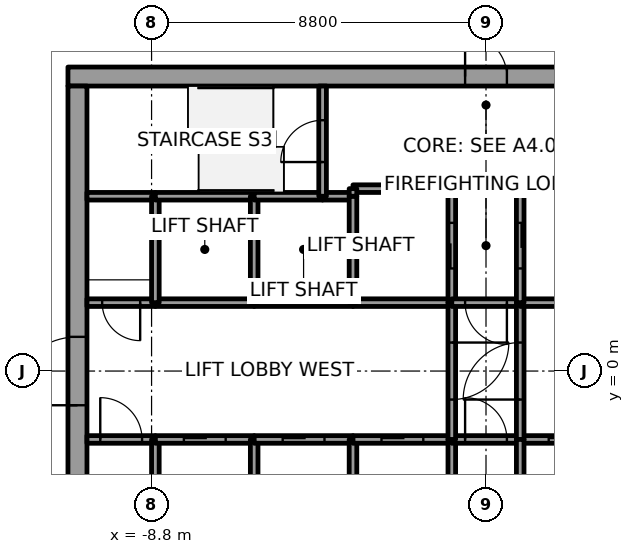
"""IFC4 building model, lengths in metres.
Left out: names, types, materials, properties, quantities, classifications, styles, units other than length and angle.
Written with IfcOpenShell. Run it as: python <this file> out.ifc"""

import sys

from ifc_helpers import new_model, si_unit, direction, frame, frame_2d, origin, place, context, subcontext, project, spatial, rectangle, extrude, element, fill, save


model = new_model("IFC4")
c1 = context("Model", 3, precision=1e-05, world=origin(), true_north=direction((0.0, 1.0)))
c2 = subcontext(c1, "Body", "Model", "MODEL_VIEW")
j1 = project(units=[si_unit("LENGTHUNIT", "METRE"), si_unit("PLANEANGLEUNIT", "RADIAN")], contexts=[c1])
p1 = place(None, origin())
s1 = spatial("IfcSite", under=j1, at=p1, CompositionType="ELEMENT")
p2 = place(p1, origin())
s2 = spatial("IfcBuilding", under=s1, at=p2, CompositionType="ELEMENT")
p3 = place(p2, frame((0.0, 0.0, 16.8)))
s3 = spatial("IfcBuildingStorey", under=s2, at=p3, CompositionType="ELEMENT", Elevation=16.8)
p4 = place(p3, frame((-11.0, 7.75, 0.0), z_axis=(0.0, 0.0, 1.0), x_axis=(1.0, 0.0, 0.0)))
e1 = element("IfcWall", 1, at=p4, inside=s3, PredefinedType="SHEAR", context=c2, shape_type="SweptSolid", body=[
    extrude(rectangle(XDim=22.0, YDim=0.5, at=frame_2d((11.0, 0.0))), origin(), (0.0, 0.0, 1.0), 5.4),
])
p5 = place(p4, frame((10.45, 0.0, 0.0)))
e2 = element("IfcOpeningElement", 2, at=p5, cuts=e1, PredefinedType="OPENING", context=c2, shape_type="SweptSolid", body=[
    extrude(rectangle(XDim=1.1, YDim=2.1, at=frame_2d((0.55, 1.05))), frame((0.0, 0.25, 0.0), z_axis=(0.0, -1.0, 0.0), x_axis=(1.0, 0.0, 0.0)), (0.0, 0.0, 1.0), 0.5),
])
p6 = place(p3, frame((-10.75, -7.5, 0.0), z_axis=(0.0, 0.0, 1.0), x_axis=(0.0, 1.0, 0.0)))
e3 = element("IfcWall", 3, at=p6, inside=s3, PredefinedType="SHEAR", context=c2, shape_type="SweptSolid", body=[
    extrude(rectangle(XDim=15.0, YDim=0.5, at=frame_2d((7.5, 0.0))), origin(), (0.0, 0.0, 1.0), 5.4),
])
p7 = place(p6, frame((6.6, 0.0, 0.0)))
e4 = element("IfcOpeningElement", 4, at=p7, cuts=e3, PredefinedType="OPENING", context=c2, shape_type="SweptSolid", body=[
    extrude(rectangle(XDim=1.8, YDim=2.1, at=frame_2d((0.9, 1.05))), frame((0.0, 0.25, 0.0), z_axis=(0.0, -1.0, 0.0), x_axis=(1.0, 0.0, 0.0)), (0.0, 0.0, 1.0), 0.5),
])
p8 = place(p3, frame((-10.5, -1.8, 0.0), z_axis=(0.0, 0.0, 1.0), x_axis=(1.0, 0.0, 0.0)))
e5 = element("IfcWall", 5, at=p8, inside=s3, PredefinedType="SOLIDWALL", context=c2, shape_type="SweptSolid", body=[
    extrude(rectangle(XDim=1.8, YDim=0.2, at=frame_2d((0.9, 0.0))), origin(), (0.0, 0.0, 1.0), 5.15),
])
p9 = place(p8, frame((0.35, 0.0, 0.0)))
e6 = element("IfcOpeningElement", 6, at=p9, cuts=e5, PredefinedType="OPENING", context=c2, shape_type="SweptSolid", body=[
    extrude(rectangle(XDim=1.1, YDim=2.4, at=frame_2d((0.55, 1.2))), frame((0.0, 0.1, 0.0), z_axis=(0.0, -1.0, 0.0), x_axis=(1.0, 0.0, 0.0)), (0.0, 0.0, 1.0), 0.2),
])
p10 = place(p3, frame((-8.7, 1.8, 0.0), z_axis=(0.0, 0.0, 1.0), x_axis=(-1.0, 0.0, 0.0)))
e7 = element("IfcWall", 7, at=p10, inside=s3, PredefinedType="SOLIDWALL", context=c2, shape_type="SweptSolid", body=[
    extrude(rectangle(XDim=1.8, YDim=0.2, at=frame_2d((0.9, 0.0))), origin(), (0.0, 0.0, 1.0), 5.15),
])
p11 = place(p10, frame((0.4, 0.0, 0.0)))
e8 = element("IfcOpeningElement", 8, at=p11, cuts=e7, PredefinedType="OPENING", context=c2, shape_type="SweptSolid", body=[
    extrude(rectangle(XDim=1.0, YDim=2.4, at=frame_2d((0.5, 1.2))), frame((0.0, 0.1, 0.0), z_axis=(0.0, -1.0, 0.0), x_axis=(1.0, 0.0, 0.0)), (0.0, 0.0, 1.0), 0.2),
])
p12 = place(p3, frame((-8.7, 4.6, 0.0), z_axis=(0.0, 0.0, 1.0), x_axis=(-1.0, 0.0, 0.0)))
e9 = element("IfcWall", 9, at=p12, inside=s3, PredefinedType="SOLIDWALL", context=c2, shape_type="SweptSolid", body=[
    extrude(rectangle(XDim=1.8, YDim=0.2, at=frame_2d((0.9, 0.0))), origin(), (0.0, 0.0, 1.0), 5.15),
])
p13 = place(p3, frame((-8.7, -4.6, 0.0), z_axis=(0.0, 0.0, 1.0), x_axis=(0.0, 1.0, 0.0)))
e10 = element("IfcWall", 10, at=p13, inside=s3, PredefinedType="SOLIDWALL", context=c2, shape_type="SweptSolid", body=[
    extrude(rectangle(XDim=2.8, YDim=0.2, at=frame_2d((1.4, 0.0))), origin(), (0.0, 0.0, 1.0), 5.15),
])
p14 = place(p3, frame((-8.7, -1.8, 0.0), z_axis=(0.0, 0.0, 1.0), x_axis=(1.0, 0.0, 0.0)))
e11 = element("IfcWall", 11, at=p14, inside=s3, PredefinedType="SOLIDWALL", context=c2, shape_type="SweptSolid", body=[
    extrude(rectangle(XDim=2.6, YDim=0.2, at=frame_2d((1.3, 0.0))), origin(), (0.0, 0.0, 1.0), 5.15),
])
p15 = place(p14, frame((0.75, 0.0, 0.0)))
e12 = element("IfcOpeningElement", 12, at=p15, cuts=e11, PredefinedType="OPENING", context=c2, shape_type="SweptSolid", body=[
    extrude(rectangle(XDim=1.1, YDim=2.1, at=frame_2d((0.55, 1.05))), frame((0.0, 0.1, 0.0), z_axis=(0.0, -1.0, 0.0), x_axis=(1.0, 0.0, 0.0)), (0.0, 0.0, 1.0), 0.2),
])
p16 = place(p3, frame((-6.1, 1.8, 0.0), z_axis=(0.0, 0.0, 1.0), x_axis=(-1.0, 0.0, 0.0)))
e13 = element("IfcWall", 13, at=p16, inside=s3, PredefinedType="SOLIDWALL", context=c2, shape_type="SweptSolid", body=[
    extrude(rectangle(XDim=2.6, YDim=0.2, at=frame_2d((1.3, 0.0))), origin(), (0.0, 0.0, 1.0), 5.15),
])
p17 = place(p3, frame((-8.7, 1.8, 0.0), z_axis=(0.0, 0.0, 1.0), x_axis=(0.0, 1.0, 0.0)))
e14 = element("IfcWall", 14, at=p17, inside=s3, PredefinedType="SOLIDWALL", context=c2, shape_type="SweptSolid", body=[
    extrude(rectangle(XDim=2.8, YDim=0.2, at=frame_2d((1.4, 0.0))), origin(), (0.0, 0.0, 1.0), 5.15),
])
p18 = place(p3, frame((-6.1, 4.6, 0.0), z_axis=(0.0, 0.0, 1.0), x_axis=(-1.0, 0.0, 0.0)))
e15 = element("IfcWall", 15, at=p18, inside=s3, PredefinedType="SOLIDWALL", context=c2, shape_type="SweptSolid", body=[
    extrude(rectangle(XDim=2.6, YDim=0.2, at=frame_2d((1.3, 0.0))), origin(), (0.0, 0.0, 1.0), 5.15),
])
p19 = place(p3, frame((-6.1, -4.6, 0.0), z_axis=(0.0, 0.0, 1.0), x_axis=(0.0, 1.0, 0.0)))
e16 = element("IfcWall", 16, at=p19, inside=s3, PredefinedType="SOLIDWALL", context=c2, shape_type="SweptSolid", body=[
    extrude(rectangle(XDim=2.8, YDim=0.2, at=frame_2d((1.4, 0.0))), origin(), (0.0, 0.0, 1.0), 5.15),
])
p20 = place(p3, frame((-6.1, -1.8, 0.0), z_axis=(0.0, 0.0, 1.0), x_axis=(1.0, 0.0, 0.0)))
e17 = element("IfcWall", 17, at=p20, inside=s3, PredefinedType="SOLIDWALL", context=c2, shape_type="SweptSolid", body=[
    extrude(rectangle(XDim=2.6, YDim=0.2, at=frame_2d((1.3, 0.0))), origin(), (0.0, 0.0, 1.0), 5.15),
])
p21 = place(p20, frame((0.75, 0.0, 0.0)))
e18 = element("IfcOpeningElement", 18, at=p21, cuts=e17, PredefinedType="OPENING", context=c2, shape_type="SweptSolid", body=[
    extrude(rectangle(XDim=1.1, YDim=2.1, at=frame_2d((0.55, 1.05))), frame((0.0, 0.1, 0.0), z_axis=(0.0, -1.0, 0.0), x_axis=(1.0, 0.0, 0.0)), (0.0, 0.0, 1.0), 0.2),
])
p22 = place(p3, frame((-3.5, 1.8, 0.0), z_axis=(0.0, 0.0, 1.0), x_axis=(-1.0, 0.0, 0.0)))
e19 = element("IfcWall", 19, at=p22, inside=s3, PredefinedType="SOLIDWALL", context=c2, shape_type="SweptSolid", body=[
    extrude(rectangle(XDim=2.6, YDim=0.2, at=frame_2d((1.3, 0.0))), origin(), (0.0, 0.0, 1.0), 5.15),
])
p23 = place(p3, frame((-6.1, 1.8, 0.0), z_axis=(0.0, 0.0, 1.0), x_axis=(0.0, 1.0, 0.0)))
e20 = element("IfcWall", 20, at=p23, inside=s3, PredefinedType="SOLIDWALL", context=c2, shape_type="SweptSolid", body=[
    extrude(rectangle(XDim=2.8, YDim=0.2, at=frame_2d((1.4, 0.0))), origin(), (0.0, 0.0, 1.0), 5.15),
])
p24 = place(p3, frame((-4.3, 4.6, 0.0), z_axis=(0.0, 0.0, 1.0), x_axis=(-1.0, 0.0, 0.0)))
e21 = element("IfcWall", 21, at=p24, inside=s3, PredefinedType="SOLIDWALL", context=c2, shape_type="SweptSolid", body=[
    extrude(rectangle(XDim=1.8, YDim=0.2, at=frame_2d((0.9, 0.0))), origin(), (0.0, 0.0, 1.0), 5.15),
])
p25 = place(p3, frame((-3.5, 4.6, 0.0), z_axis=(0.0, 0.0, 1.0), x_axis=(-1.0, 0.0, 0.0)))
e22 = element("IfcWall", 22, at=p25, inside=s3, PredefinedType="SOLIDWALL", context=c2, shape_type="SweptSolid", body=[
    extrude(rectangle(XDim=0.8, YDim=0.2, at=frame_2d((0.4, 0.0))), origin(), (0.0, 0.0, 1.0), 5.15),
])
p26 = place(p3, frame((-4.3, 4.6, 0.0), z_axis=(0.0, 0.0, 1.0), x_axis=(0.0, 1.0, 0.0)))
e23 = element("IfcWall", 23, at=p26, inside=s3, PredefinedType="SOLIDWALL", context=c2, shape_type="SweptSolid", body=[
    extrude(rectangle(XDim=2.9, YDim=0.2, at=frame_2d((1.45, 0.0))), origin(), (0.0, 0.0, 1.0), 5.15),
])
p27 = place(p26, frame((0.9, 0.0, 0.0)))
e24 = element("IfcOpeningElement", 24, at=p27, cuts=e23, PredefinedType="OPENING", context=c2, shape_type="SweptSolid", body=[
    extrude(rectangle(XDim=1.1, YDim=2.4, at=frame_2d((0.55, 1.2))), frame((0.0, 0.1, 0.0), z_axis=(0.0, -1.0, 0.0), x_axis=(1.0, 0.0, 0.0)), (0.0, 0.0, 1.0), 0.2),
])
p28 = place(p3, frame((-3.5, -4.6, 0.0), z_axis=(0.0, 0.0, 1.0), x_axis=(0.0, 1.0, 0.0)))
e25 = element("IfcWall", 25, at=p28, inside=s3, PredefinedType="SOLIDWALL", context=c2, shape_type="SweptSolid", body=[
    extrude(rectangle(XDim=2.8, YDim=0.2, at=frame_2d((1.4, 0.0))), origin(), (0.0, 0.0, 1.0), 5.15),
])
p29 = place(p3, frame((-3.5, -1.8, 0.0), z_axis=(0.0, 0.0, 1.0), x_axis=(1.0, 0.0, 0.0)))
e26 = element("IfcWall", 26, at=p29, inside=s3, PredefinedType="SOLIDWALL", context=c2, shape_type="SweptSolid", body=[
    extrude(rectangle(XDim=2.6, YDim=0.2, at=frame_2d((1.3, 0.0))), origin(), (0.0, 0.0, 1.0), 5.15),
])
p30 = place(p29, frame((0.75, 0.0, 0.0)))
e27 = element("IfcOpeningElement", 27, at=p30, cuts=e26, PredefinedType="OPENING", context=c2, shape_type="SweptSolid", body=[
    extrude(rectangle(XDim=1.1, YDim=2.1, at=frame_2d((0.55, 1.05))), frame((0.0, 0.1, 0.0), z_axis=(0.0, -1.0, 0.0), x_axis=(1.0, 0.0, 0.0)), (0.0, 0.0, 1.0), 0.2),
])
p31 = place(p3, frame((-0.9, 1.8, 0.0), z_axis=(0.0, 0.0, 1.0), x_axis=(-1.0, 0.0, 0.0)))
e28 = element("IfcWall", 28, at=p31, inside=s3, PredefinedType="SOLIDWALL", context=c2, shape_type="SweptSolid", body=[
    extrude(rectangle(XDim=2.6, YDim=0.2, at=frame_2d((1.3, 0.0))), origin(), (0.0, 0.0, 1.0), 5.15),
])
p32 = place(p3, frame((-3.5, 4.6, 0.0), z_axis=(0.0, 0.0, 1.0), x_axis=(0.0, -1.0, 0.0)))
e29 = element("IfcWall", 29, at=p32, inside=s3, PredefinedType="SOLIDWALL", context=c2, shape_type="SweptSolid", body=[
    extrude(rectangle(XDim=2.8, YDim=0.2, at=frame_2d((1.4, 0.0))), origin(), (0.0, 0.0, 1.0), 5.15),
])
p33 = place(p3, frame((-0.9, 1.8, 0.0), z_axis=(0.0, 0.0, 1.0), x_axis=(0.0, 1.0, 0.0)))
e30 = element("IfcWall", 30, at=p33, inside=s3, PredefinedType="SOLIDWALL", context=c2, shape_type="SweptSolid", body=[
    extrude(rectangle(XDim=3.0, YDim=0.2, at=frame_2d((1.5, 0.0))), origin(), (0.0, 0.0, 1.0), 5.15),
])
p34 = place(p33, frame((0.9, 0.0, 0.0)))
e31 = element("IfcOpeningElement", 31, at=p34, cuts=e30, PredefinedType="OPENING", context=c2, shape_type="SweptSolid", body=[
    extrude(rectangle(XDim=1.2, YDim=2.1, at=frame_2d((0.6, 1.05))), frame((0.0, 0.1, 0.0), z_axis=(0.0, -1.0, 0.0), x_axis=(1.0, 0.0, 0.0)), (0.0, 0.0, 1.0), 0.2),
])
p35 = place(p3, frame((-0.9, 4.8, 0.0), z_axis=(0.0, 0.0, 1.0), x_axis=(-1.0, 0.0, 0.0)))
e32 = element("IfcWall", 32, at=p35, inside=s3, PredefinedType="SOLIDWALL", context=c2, shape_type="SweptSolid", body=[
    extrude(rectangle(XDim=2.6, YDim=0.2, at=frame_2d((1.3, 0.0))), origin(), (0.0, 0.0, 1.0), 5.15),
])
p36 = place(p3, frame((-3.5, 4.8, 0.0), z_axis=(0.0, 0.0, 1.0), x_axis=(0.0, -1.0, 0.0)))
e33 = element("IfcWall", 33, at=p36, inside=s3, PredefinedType="SOLIDWALL", context=c2, shape_type="SweptSolid", body=[
    extrude(rectangle(XDim=0.2, YDim=0.2, at=frame_2d((0.1, 0.0))), origin(), (0.0, 0.0, 1.0), 5.15),
])
p37 = place(p3, frame((-0.9, -4.6, 0.0), z_axis=(0.0, 0.0, 1.0), x_axis=(0.0, 1.0, 0.0)))
e34 = element("IfcWall", 34, at=p37, inside=s3, PredefinedType="SOLIDWALL", context=c2, shape_type="SweptSolid", body=[
    extrude(rectangle(XDim=2.8, YDim=0.2, at=frame_2d((1.4, 0.0))), origin(), (0.0, 0.0, 1.0), 5.15),
])
p38 = place(p3, frame((-0.9, -1.8, 0.0), z_axis=(0.0, 0.0, 1.0), x_axis=(1.0, 0.0, 0.0)))
e35 = element("IfcWall", 35, at=p38, inside=s3, PredefinedType="SOLIDWALL", context=c2, shape_type="SweptSolid", body=[
    extrude(rectangle(XDim=1.8, YDim=0.2, at=frame_2d((0.9, 0.0))), origin(), (0.0, 0.0, 1.0), 5.15),
])
p39 = place(p38, frame((0.35, 0.0, 0.0)))
e36 = element("IfcOpeningElement", 36, at=p39, cuts=e35, PredefinedType="OPENING", context=c2, shape_type="SweptSolid", body=[
    extrude(rectangle(XDim=1.1, YDim=2.4, at=frame_2d((0.55, 1.2))), frame((0.0, 0.1, 0.0), z_axis=(0.0, -1.0, 0.0), x_axis=(1.0, 0.0, 0.0)), (0.0, 0.0, 1.0), 0.2),
])
p40 = place(p3, frame((-0.9, 1.8, 0.0), z_axis=(0.0, 0.0, 1.0), x_axis=(0.0, -1.0, 0.0)))
e37 = element("IfcWall", 37, at=p40, inside=s3, PredefinedType="SOLIDWALL", context=c2, shape_type="SweptSolid", body=[
    extrude(rectangle(XDim=3.6, YDim=0.2, at=frame_2d((1.8, 0.0))), origin(), (0.0, 0.0, 1.0), 5.15),
])
p41 = place(p40, frame((1.05, 0.0, 0.0)))
e38 = element("IfcOpeningElement", 38, at=p41, cuts=e37, PredefinedType="OPENING", context=c2, shape_type="SweptSolid", body=[
    extrude(rectangle(XDim=1.5, YDim=2.4, at=frame_2d((0.75, 1.2))), frame((0.0, 0.1, 0.0), z_axis=(0.0, -1.0, 0.0), x_axis=(1.0, 0.0, 0.0)), (0.0, 0.0, 1.0), 0.2),
])
p42 = place(p3, frame((0.9, 1.8, 0.0), z_axis=(0.0, 0.0, 1.0), x_axis=(-1.0, 0.0, 0.0)))
e39 = element("IfcWall", 39, at=p42, inside=s3, PredefinedType="SOLIDWALL", context=c2, shape_type="SweptSolid", body=[
    extrude(rectangle(XDim=1.8, YDim=0.2, at=frame_2d((0.9, 0.0))), origin(), (0.0, 0.0, 1.0), 5.15),
])
p43 = place(p42, frame((0.35, 0.0, 0.0)))
e40 = element("IfcOpeningElement", 40, at=p43, cuts=e39, PredefinedType="OPENING", context=c2, shape_type="SweptSolid", body=[
    extrude(rectangle(XDim=1.1, YDim=2.4, at=frame_2d((0.55, 1.2))), frame((0.0, 0.1, 0.0), z_axis=(0.0, -1.0, 0.0), x_axis=(1.0, 0.0, 0.0)), (0.0, 0.0, 1.0), 0.2),
])
p44 = place(p3, frame((0.9, -1.8, 0.0), z_axis=(0.0, 0.0, 1.0), x_axis=(1.0, 0.0, 0.0)))
e41 = element("IfcWall", 41, at=p44, inside=s3, PredefinedType="SOLIDWALL", context=c2, shape_type="SweptSolid", body=[
    extrude(rectangle(XDim=2.6, YDim=0.2, at=frame_2d((1.3, 0.0))), origin(), (0.0, 0.0, 1.0), 5.15),
])
p45 = place(p44, frame((0.75, 0.0, 0.0)))
e42 = element("IfcOpeningElement", 42, at=p45, cuts=e41, PredefinedType="OPENING", context=c2, shape_type="SweptSolid", body=[
    extrude(rectangle(XDim=1.1, YDim=2.1, at=frame_2d((0.55, 1.05))), frame((0.0, 0.1, 0.0), z_axis=(0.0, -1.0, 0.0), x_axis=(1.0, 0.0, 0.0)), (0.0, 0.0, 1.0), 0.2),
])
p46 = place(p3, frame((0.9, -1.8, 0.0), z_axis=(0.0, 0.0, 1.0), x_axis=(0.0, 1.0, 0.0)))
e43 = element("IfcWall", 43, at=p46, inside=s3, PredefinedType="SOLIDWALL", context=c2, shape_type="SweptSolid", body=[
    extrude(rectangle(XDim=3.6, YDim=0.2, at=frame_2d((1.8, 0.0))), origin(), (0.0, 0.0, 1.0), 5.15),
])
p47 = place(p46, frame((1.05, 0.0, 0.0)))
e44 = element("IfcOpeningElement", 44, at=p47, cuts=e43, PredefinedType="OPENING", context=c2, shape_type="SweptSolid", body=[
    extrude(rectangle(XDim=1.5, YDim=2.4, at=frame_2d((0.75, 1.2))), frame((0.0, 0.1, 0.0), z_axis=(0.0, -1.0, 0.0), x_axis=(1.0, 0.0, 0.0)), (0.0, 0.0, 1.0), 0.2),
])
p48 = place(p3, frame((0.9, -1.8, 0.0), z_axis=(0.0, 0.0, 1.0), x_axis=(0.0, -1.0, 0.0)))
e45 = element("IfcWall", 45, at=p48, inside=s3, PredefinedType="SOLIDWALL", context=c2, shape_type="SweptSolid", body=[
    extrude(rectangle(XDim=2.8, YDim=0.2, at=frame_2d((1.4, 0.0))), origin(), (0.0, 0.0, 1.0), 5.15),
])
for number, where, z_axis, x_axis in (
    (46, (3.5, 1.8, 0.0), (0.0, 0.0, 1.0), (-1.0, 0.0, 0.0)),
    (47, (3.5, 4.8, 0.0), (0.0, 0.0, 1.0), (-1.0, 0.0, 0.0)),
):
    element("IfcWall", number, at=place(p3, frame(where, z_axis=z_axis, x_axis=x_axis)), inside=s3, PredefinedType="SOLIDWALL", context=c2, shape_type="SweptSolid", body=[
        extrude(rectangle(XDim=2.6, YDim=0.2, at=frame_2d((1.3, 0.0))), origin(), (0.0, 0.0, 1.0), 5.15),
    ])
p49 = place(p3, frame((0.9, 4.8, 0.0), z_axis=(0.0, 0.0, 1.0), x_axis=(0.0, -1.0, 0.0)))
e48 = element("IfcWall", 48, at=p49, inside=s3, PredefinedType="SOLIDWALL", context=c2, shape_type="SweptSolid", body=[
    extrude(rectangle(XDim=3.0, YDim=0.2, at=frame_2d((1.5, 0.0))), origin(), (0.0, 0.0, 1.0), 5.15),
])
p50 = place(p49, frame((0.9, 0.0, 0.0)))
e49 = element("IfcOpeningElement", 49, at=p50, cuts=e48, PredefinedType="OPENING", context=c2, shape_type="SweptSolid", body=[
    extrude(rectangle(XDim=1.2, YDim=2.1, at=frame_2d((0.6, 1.05))), frame((0.0, 0.1, 0.0), z_axis=(0.0, -1.0, 0.0), x_axis=(1.0, 0.0, 0.0)), (0.0, 0.0, 1.0), 0.2),
])
p51 = place(p15, origin())
e50 = element("IfcDoor", 50, at=p51, inside=s3, OperationType="SLIDING_TO_LEFT", PredefinedType="DOOR", context=c2, shape_type="SweptSolid", body=[
    extrude(rectangle(XDim=1.1, YDim=2.1, at=frame_2d((0.55, 1.05))), frame((0.0, 0.025, 0.0), z_axis=(0.0, -1.0, 0.0), x_axis=(1.0, 0.0, 0.0)), (0.0, 0.0, 1.0), 0.05),
])
fill(e12, e50)
p52 = place(p21, origin())
e51 = element("IfcDoor", 51, at=p52, inside=s3, OperationType="SLIDING_TO_RIGHT", PredefinedType="DOOR", context=c2, shape_type="SweptSolid", body=[
    extrude(rectangle(XDim=1.1, YDim=2.1, at=frame_2d((0.55, 1.05))), frame((0.0, 0.025, 0.0), z_axis=(0.0, -1.0, 0.0), x_axis=(1.0, 0.0, 0.0)), (0.0, 0.0, 1.0), 0.05),
])
fill(e18, e51)
p53 = place(p30, origin())
e52 = element("IfcDoor", 52, at=p53, inside=s3, OperationType="SLIDING_TO_RIGHT", PredefinedType="DOOR", context=c2, shape_type="SweptSolid", body=[
    extrude(rectangle(XDim=1.1, YDim=2.1, at=frame_2d((0.55, 1.05))), frame((0.0, 0.025, 0.0), z_axis=(0.0, -1.0, 0.0), x_axis=(1.0, 0.0, 0.0)), (0.0, 0.0, 1.0), 0.05),
])
fill(e27, e52)
p54 = place(p45, origin())
e53 = element("IfcDoor", 53, at=p54, inside=s3, OperationType="SLIDING_TO_LEFT", PredefinedType="DOOR", context=c2, shape_type="SweptSolid", body=[
    extrude(rectangle(XDim=1.1, YDim=2.1, at=frame_2d((0.55, 1.05))), frame((0.0, 0.025, 0.0), z_axis=(0.0, -1.0, 0.0), x_axis=(1.0, 0.0, 0.0)), (0.0, 0.0, 1.0), 0.05),
])
fill(e42, e53)
p55 = place(p34, origin())
e54 = element("IfcDoor", 54, at=p55, inside=s3, OperationType="SLIDING_TO_RIGHT", PredefinedType="DOOR", context=c2, shape_type="SweptSolid", body=[
    extrude(rectangle(XDim=1.2, YDim=2.1, at=frame_2d((0.6, 1.05))), frame((0.0, 0.025, 0.0), z_axis=(0.0, -1.0, 0.0), x_axis=(1.0, 0.0, 0.0)), (0.0, 0.0, 1.0), 0.05),
])
fill(e31, e54)
p56 = place(p50, origin())
e55 = element("IfcDoor", 55, at=p56, inside=s3, OperationType="SLIDING_TO_RIGHT", PredefinedType="DOOR", context=c2, shape_type="SweptSolid", body=[
    extrude(rectangle(XDim=1.2, YDim=2.1, at=frame_2d((0.6, 1.05))), frame((0.0, 0.025, 0.0), z_axis=(0.0, -1.0, 0.0), x_axis=(1.0, 0.0, 0.0)), (0.0, 0.0, 1.0), 0.05),
])
fill(e49, e55)
p57 = place(p41, origin())
e56 = element("IfcDoor", 56, at=p57, inside=s3, OperationType="DOUBLE_DOOR_SINGLE_SWING", PredefinedType="DOOR", context=c2, shape_type="SweptSolid", body=[
    extrude(rectangle(XDim=1.5, YDim=2.4, at=frame_2d((0.75, 1.2))), frame((0.0, 0.025, 0.0), z_axis=(0.0, -1.0, 0.0), x_axis=(1.0, 0.0, 0.0)), (0.0, 0.0, 1.0), 0.05),
])
fill(e38, e56)
p58 = place(p47, origin())
e57 = element("IfcDoor", 57, at=p58, inside=s3, OperationType="DOUBLE_DOOR_SINGLE_SWING", PredefinedType="DOOR", context=c2, shape_type="SweptSolid", body=[
    extrude(rectangle(XDim=1.5, YDim=2.4, at=frame_2d((0.75, 1.2))), frame((0.0, 0.025, 0.0), z_axis=(0.0, -1.0, 0.0), x_axis=(1.0, 0.0, 0.0)), (0.0, 0.0, 1.0), 0.05),
])
fill(e44, e57)
p59 = place(p9, origin())
e58 = element("IfcDoor", 58, at=p59, inside=s3, OperationType="SINGLE_SWING_LEFT", PredefinedType="DOOR", context=c2, shape_type="SweptSolid", body=[
    extrude(rectangle(XDim=1.1, YDim=2.4, at=frame_2d((0.55, 1.2))), frame((0.0, 0.025, 0.0), z_axis=(0.0, -1.0, 0.0), x_axis=(1.0, 0.0, 0.0)), (0.0, 0.0, 1.0), 0.05),
])
fill(e6, e58)
p60 = place(p43, origin())
e59 = element("IfcDoor", 59, at=p60, inside=s3, OperationType="SINGLE_SWING_RIGHT", PredefinedType="DOOR", context=c2, shape_type="SweptSolid", body=[
    extrude(rectangle(XDim=1.1, YDim=2.4, at=frame_2d((0.55, 1.2))), frame((0.0, 0.025, 0.0), z_axis=(0.0, -1.0, 0.0), x_axis=(1.0, 0.0, 0.0)), (0.0, 0.0, 1.0), 0.05),
])
fill(e40, e59)
p61 = place(p39, origin())
e60 = element("IfcDoor", 60, at=p61, inside=s3, OperationType="SINGLE_SWING_RIGHT", PredefinedType="DOOR", context=c2, shape_type="SweptSolid", body=[
    extrude(rectangle(XDim=1.1, YDim=2.4, at=frame_2d((0.55, 1.2))), frame((0.0, 0.025, 0.0), z_axis=(0.0, -1.0, 0.0), x_axis=(1.0, 0.0, 0.0)), (0.0, 0.0, 1.0), 0.05),
])
fill(e36, e60)
p62 = place(p11, origin())
e61 = element("IfcDoor", 61, at=p62, inside=s3, OperationType="SINGLE_SWING_LEFT", PredefinedType="DOOR", context=c2, shape_type="SweptSolid", body=[
    extrude(rectangle(XDim=1.0, YDim=2.4, at=frame_2d((0.5, 1.2))), frame((0.0, 0.025, 0.0), z_axis=(0.0, -1.0, 0.0), x_axis=(1.0, 0.0, 0.0)), (0.0, 0.0, 1.0), 0.05),
])
fill(e8, e61)
p63 = place(p27, origin())
e62 = element("IfcDoor", 62, at=p63, inside=s3, OperationType="SINGLE_SWING_LEFT", PredefinedType="DOOR", context=c2, shape_type="SweptSolid", body=[
    extrude(rectangle(XDim=1.1, YDim=2.4, at=frame_2d((0.55, 1.2))), frame((0.0, 0.025, 0.0), z_axis=(0.0, -1.0, 0.0), x_axis=(1.0, 0.0, 0.0)), (0.0, 0.0, 1.0), 0.05),
])
fill(e24, e62)
p64 = place(p7, origin())
e63 = element("IfcDoor", 63, at=p64, inside=s3, OperationType="DOUBLE_DOOR_SINGLE_SWING", PredefinedType="DOOR", context=c2, shape_type="SweptSolid", body=[
    extrude(rectangle(XDim=1.8, YDim=2.1, at=frame_2d((0.9, 1.05))), frame((0.0, 0.025, 0.0), z_axis=(0.0, -1.0, 0.0), x_axis=(1.0, 0.0, 0.0)), (0.0, 0.0, 1.0), 0.05),
])
fill(e4, e63)
p65 = place(p5, origin())
e64 = element("IfcDoor", 64, at=p65, inside=s3, OperationType="SINGLE_SWING_LEFT", PredefinedType="DOOR", context=c2, shape_type="SweptSolid", body=[
    extrude(rectangle(XDim=1.1, YDim=2.1, at=frame_2d((0.55, 1.05))), frame((0.0, 0.025, 0.0), z_axis=(0.0, -1.0, 0.0), x_axis=(1.0, 0.0, 0.0)), (0.0, 0.0, 1.0), 0.05),
])
fill(e2, e64)
save(model, sys.argv[1])
